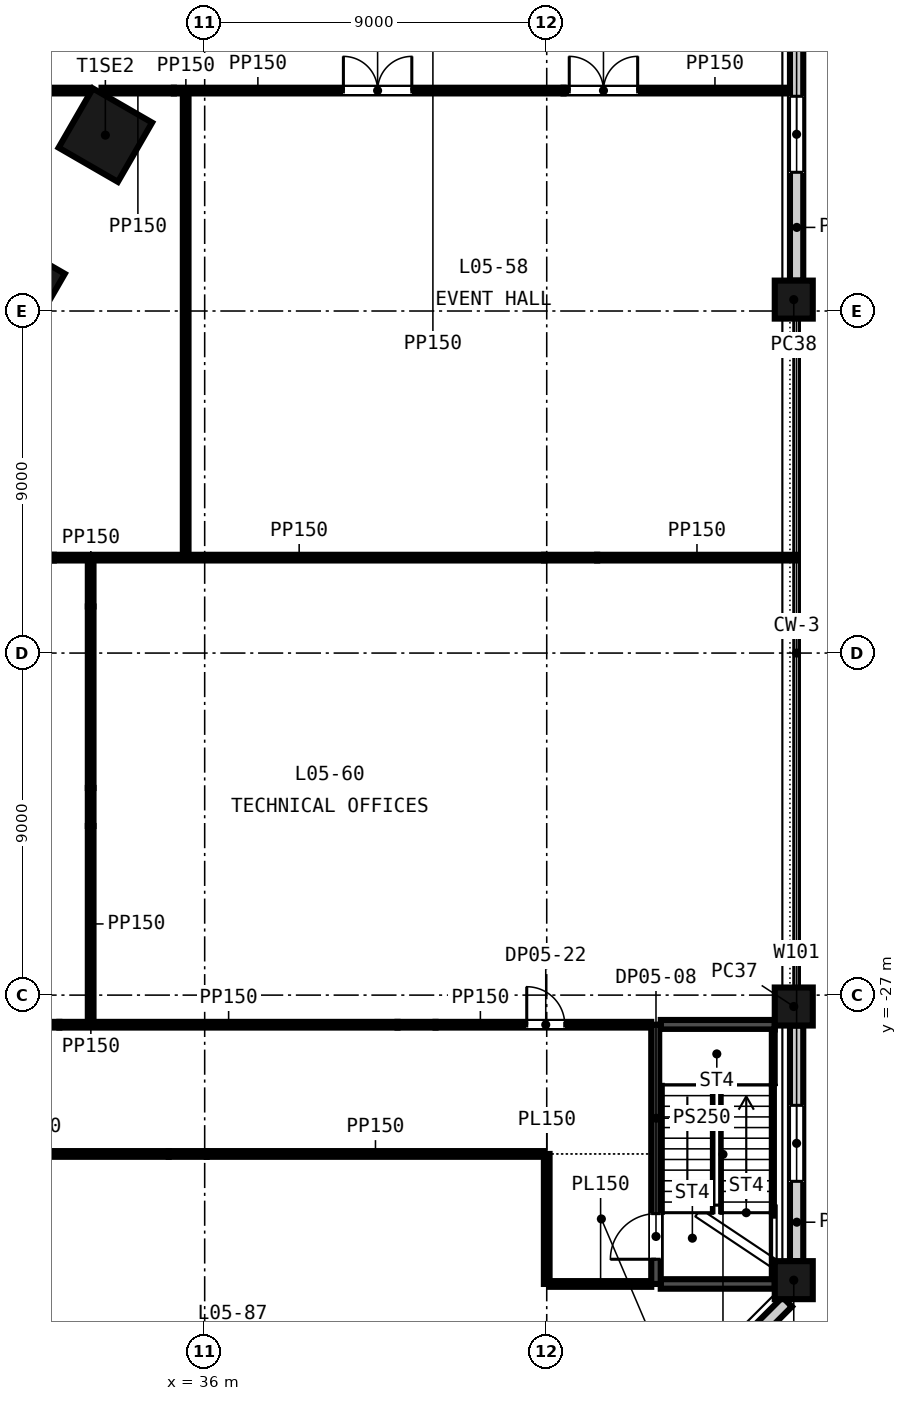
"""IFC4 building model, lengths in metres.
Left out: names, types, materials, properties, quantities, classifications, styles, units other than length and angle.
Written with IfcOpenShell. Run it as: python <this file> out.ifc"""

import sys

from ifc_helpers import new_model, si_unit, direction, frame, frame_2d, origin, origin_2d, place, context, subcontext, project, spatial, rectangle, extrude, element, fill, save


model = new_model("IFC4")
c1 = context("Model", 3, precision=1e-05, world=origin(), true_north=direction((0.0, 1.0)))
c2 = subcontext(c1, "Body", "Model", "MODEL_VIEW")
j1 = project(units=[si_unit("LENGTHUNIT", "METRE"), si_unit("PLANEANGLEUNIT", "RADIAN")], contexts=[c1])
p1 = place(None, origin())
s1 = spatial("IfcSite", under=j1, at=p1, CompositionType="ELEMENT")
p2 = place(p1, origin())
s2 = spatial("IfcBuilding", under=s1, at=p2, CompositionType="ELEMENT")
p3 = place(p2, frame((0.0, 0.0, 31.5)))
s3 = spatial("IfcBuildingStorey", under=s2, at=p3, CompositionType="ELEMENT", Elevation=31.5)
for number, where, z_axis, x_axis in (
    (1, (31.09, -8.35, -0.3), (0.0, 0.0, 1.0), (0.5, 0.866, 0.0)),
    (2, (33.387, -4.373, -0.3), (0.0, 0.0, 1.0), (0.5, 0.866, 0.0)),
):
    element("IfcColumn", number, at=place(p3, frame(where, z_axis=z_axis, x_axis=x_axis)), inside=s3, PredefinedType="COLUMN", context=c2, shape_type="SweptSolid", body=[
        extrude(rectangle(XDim=1.8, YDim=1.8, at=origin_2d()), origin(), (0.0, 0.0, 1.0), 4.65),
    ])
for number, where, z_axis, x_axis in (
    (3, (51.5, -34.5, -0.3), (0.0, 0.0, 1.0), (0.0, 1.0, 0.0)),
    (4, (51.5, -27.3, -0.3), (0.0, 0.0, 1.0), (0.0, 1.0, 0.0)),
    (5, (51.5, -8.7, -0.3), (0.0, 0.0, 1.0), (0.0, 1.0, 0.0)),
):
    element("IfcColumn", number, at=place(p3, frame(where, z_axis=z_axis, x_axis=x_axis)), inside=s3, PredefinedType="COLUMN", context=c2, shape_type="SweptSolid", body=[
        extrude(rectangle(XDim=1.0, YDim=1.0, at=origin_2d()), origin(), (0.0, 0.0, 1.0), 4.65),
    ])
p4 = place(p3, frame((46.072, -40.327, -0.3), z_axis=(0.0, 0.0, 1.0), x_axis=(0.707106781187, 0.707106781187, 0.0)))
e6 = element("IfcWall", 6, at=p4, inside=s3, PredefinedType="SOLIDWALL", context=c2, shape_type="SweptSolid", body=[
    extrude(rectangle(XDim=7.433, YDim=0.35, at=frame_2d((3.716, 0.0))), origin(), (0.0, 0.0, 1.0), 3.75),
])
p5 = place(p3, frame((51.575, -34.0, -0.3), z_axis=(0.0, 0.0, 1.0), x_axis=(0.0, 1.0, 0.0)))
e7 = element("IfcWall", 7, at=p5, inside=s3, PredefinedType="SOLIDWALL", context=c2, shape_type="SweptSolid", body=[
    extrude(rectangle(XDim=6.2, YDim=0.35, at=frame_2d((3.1, 0.0))), origin(), (0.0, 0.0, 1.0), 3.75),
])
p6 = place(p5, frame((2.1, 0.0, 1.2)))
e8 = element("IfcOpeningElement", 8, at=p6, cuts=e7, PredefinedType="OPENING", context=c2, shape_type="SweptSolid", body=[
    extrude(rectangle(XDim=2.0, YDim=2.5, at=frame_2d((1.0, 1.25))), frame((0.0, 0.185, 0.0), z_axis=(0.0, -1.0, 0.0), x_axis=(1.0, 0.0, 0.0)), (0.0, 0.0, 1.0), 0.37),
])
p7 = place(p3, frame((51.575, -8.2, -0.3), z_axis=(0.0, 0.0, 1.0), x_axis=(0.0, 1.0, 0.0)))
e9 = element("IfcWall", 9, at=p7, inside=s3, PredefinedType="SOLIDWALL", context=c2, shape_type="SweptSolid", body=[
    extrude(rectangle(XDim=7.7, YDim=0.35, at=frame_2d((3.85, 0.0))), origin(), (0.0, 0.0, 1.0), 3.75),
])
p8 = place(p7, frame((2.85, 0.0, 1.2)))
e10 = element("IfcOpeningElement", 10, at=p8, cuts=e9, PredefinedType="OPENING", context=c2, shape_type="SweptSolid", body=[
    extrude(rectangle(XDim=2.0, YDim=2.5, at=frame_2d((1.0, 1.25))), frame((0.0, 0.185, 0.0), z_axis=(0.0, -1.0, 0.0), x_axis=(1.0, 0.0, 0.0)), (0.0, 0.0, 1.0), 0.37),
])
p9 = place(p3, frame((45.075, -34.6, 0.0), z_axis=(0.0, 0.0, 1.0), x_axis=(1.0, 0.0, 0.0)))
e11 = element("IfcWall", 11, at=p9, inside=s3, PredefinedType="PARTITIONING", context=c2, shape_type="SweptSolid", body=[
    extrude(rectangle(XDim=2.675, YDim=0.15, at=frame_2d((1.337, 0.0))), origin(), (0.0, 0.0, 1.0), 4.35),
])
p10 = place(p3, frame((48.0, -34.6, 0.0), z_axis=(0.0, 0.0, 1.0), x_axis=(1.0, 0.0, 0.0)))
e12 = element("IfcWall", 12, at=p10, inside=s3, PredefinedType="SHEAR", context=c2, shape_type="SweptSolid", body=[
    extrude(rectangle(XDim=3.0, YDim=0.25, at=frame_2d((1.5, 0.0))), origin(), (0.0, 0.0, 1.0), 4.35),
])
p11 = place(p3, frame((27.843, -31.179, 0.0), z_axis=(0.0, 0.0, 1.0), x_axis=(1.0, 0.0, 0.0)))
e13 = element("IfcWall", 13, at=p11, inside=s3, PredefinedType="PARTITIONING", context=c2, shape_type="SweptSolid", body=[
    extrude(rectangle(XDim=7.209, YDim=0.15, at=frame_2d((3.605, 0.0))), origin(), (0.0, 0.0, 1.0), 4.35),
])
p12 = place(p3, frame((35.053, -31.179, 0.0), z_axis=(0.0, 0.0, 1.0), x_axis=(1.0, 0.0, 0.0)))
e14 = element("IfcWall", 14, at=p12, inside=s3, PredefinedType="PARTITIONING", context=c2, shape_type="SweptSolid", body=[
    extrude(rectangle(XDim=1.0, YDim=0.15, at=frame_2d((0.5, 0.0))), origin(), (0.0, 0.0, 1.0), 3.261),
])
p13 = place(p3, frame((36.053, -31.179, 0.0), z_axis=(0.0, 0.0, 1.0), x_axis=(1.0, 0.0, 0.0)))
e15 = element("IfcWall", 15, at=p13, inside=s3, PredefinedType="PARTITIONING", context=c2, shape_type="SweptSolid", body=[
    extrude(rectangle(XDim=8.872, YDim=0.15, at=frame_2d((4.436, 0.0))), origin(), (0.0, 0.0, 1.0), 4.35),
])
p14 = place(p3, frame((31.176, -27.779, 0.0), z_axis=(0.0, 0.0, 1.0), x_axis=(1.0, 0.0, 0.0)))
e16 = element("IfcWall", 16, at=p14, inside=s3, PredefinedType="PARTITIONING", context=c2, shape_type="SweptSolid", body=[
    extrude(rectangle(XDim=1.0, YDim=0.15, at=frame_2d((0.5, 0.0))), origin(), (0.0, 0.0, 1.0), 3.261),
])
p15 = place(p3, frame((32.176, -27.779, 0.0), z_axis=(0.0, 0.0, 1.0), x_axis=(1.0, 0.0, 0.0)))
e17 = element("IfcWall", 17, at=p15, inside=s3, PredefinedType="PARTITIONING", context=c2, shape_type="SweptSolid", body=[
    extrude(rectangle(XDim=8.898, YDim=0.15, at=frame_2d((4.449, 0.0))), origin(), (0.0, 0.0, 1.0), 4.35),
])
p16 = place(p3, frame((41.074, -27.779, 0.0), z_axis=(0.0, 0.0, 1.0), x_axis=(1.0, 0.0, 0.0)))
e18 = element("IfcWall", 18, at=p16, inside=s3, PredefinedType="PARTITIONING", context=c2, shape_type="SweptSolid", body=[
    extrude(rectangle(XDim=1.0, YDim=0.15, at=frame_2d((0.5, 0.0))), origin(), (0.0, 0.0, 1.0), 3.261),
])
p17 = place(p3, frame((42.074, -27.779, 0.0), z_axis=(0.0, 0.0, 1.0), x_axis=(1.0, 0.0, 0.0)))
e19 = element("IfcWall", 19, at=p17, inside=s3, PredefinedType="PARTITIONING", context=c2, shape_type="SweptSolid", body=[
    extrude(rectangle(XDim=5.676, YDim=0.15, at=frame_2d((2.838, 0.0))), origin(), (0.0, 0.0, 1.0), 4.35),
])
p18 = place(p17, frame((2.4, 0.0, 0.0)))
e20 = element("IfcOpeningElement", 20, at=p18, cuts=e19, PredefinedType="OPENING", context=c2, shape_type="SweptSolid", body=[
    extrude(rectangle(XDim=1.0, YDim=2.1, at=frame_2d((0.5, 1.05))), frame((0.0, 0.085, 0.0), z_axis=(0.0, -1.0, 0.0), x_axis=(1.0, 0.0, 0.0)), (0.0, 0.0, 1.0), 0.17),
])
p19 = place(p3, frame((48.0, -27.779, 0.0), z_axis=(0.0, 0.0, 1.0), x_axis=(1.0, 0.0, 0.0)))
e21 = element("IfcWall", 21, at=p19, inside=s3, PredefinedType="SHEAR", context=c2, shape_type="SweptSolid", body=[
    extrude(rectangle(XDim=3.0, YDim=0.25, at=frame_2d((1.5, 0.0))), origin(), (0.0, 0.0, 1.0), 4.35),
])
p20 = place(p3, frame((30.787, -15.489, 0.0), z_axis=(0.0, 0.0, 1.0), x_axis=(1.0, 0.0, 0.0)))
e22 = element("IfcWall", 22, at=p20, inside=s3, PredefinedType="PARTITIONING", context=c2, shape_type="SweptSolid", body=[
    extrude(rectangle(XDim=1.244, YDim=0.15, at=frame_2d((0.622, 0.0))), origin(), (0.0, 0.0, 1.0), 3.261),
])
p21 = place(p3, frame((32.031, -15.489, 0.0), z_axis=(0.0, 0.0, 1.0), x_axis=(1.0, 0.0, 0.0)))
e23 = element("IfcWall", 23, at=p21, inside=s3, PredefinedType="PARTITIONING", context=c2, shape_type="SweptSolid", body=[
    extrude(rectangle(XDim=12.901, YDim=0.15, at=frame_2d((6.451, 0.0))), origin(), (0.0, 0.0, 1.0), 4.35),
])
p22 = place(p3, frame((44.932, -15.489, 0.0), z_axis=(0.0, 0.0, 1.0), x_axis=(1.0, 0.0, 0.0)))
e24 = element("IfcWall", 24, at=p22, inside=s3, PredefinedType="PARTITIONING", context=c2, shape_type="SweptSolid", body=[
    extrude(rectangle(XDim=1.395, YDim=0.15, at=frame_2d((0.698, 0.0))), origin(), (0.0, 0.0, 1.0), 3.369),
])
p23 = place(p3, frame((46.327, -15.489, 0.0), z_axis=(0.0, 0.0, 1.0), x_axis=(1.0, 0.0, 0.0)))
e25 = element("IfcWall", 25, at=p23, inside=s3, PredefinedType="PARTITIONING", context=c2, shape_type="SweptSolid", body=[
    extrude(rectangle(XDim=5.243, YDim=0.15, at=frame_2d((2.622, 0.0))), origin(), (0.0, 0.0, 1.0), 4.35),
])
p24 = place(p3, frame((-17.925, -3.2, 0.0), z_axis=(0.0, 0.0, 1.0), x_axis=(1.0, 0.0, 0.0)))
e26 = element("IfcWall", 26, at=p24, inside=s3, PredefinedType="PARTITIONING", context=c2, shape_type="SweptSolid", body=[
    extrude(rectangle(XDim=50.906, YDim=0.15, at=frame_2d((25.453, 0.0))), origin(), (0.0, 0.0, 1.0), 4.35),
])
p25 = place(p24, frame((3.9, 0.0, 0.0)))
e27 = element("IfcOpeningElement", 27, at=p25, cuts=e26, PredefinedType="OPENING", context=c2, shape_type="SweptSolid", body=[
    extrude(rectangle(XDim=1.0, YDim=2.1, at=frame_2d((0.5, 1.05))), frame((0.0, 0.085, 0.0), z_axis=(0.0, -1.0, 0.0), x_axis=(1.0, 0.0, 0.0)), (0.0, 0.0, 1.0), 0.17),
])
p26 = place(p24, frame((28.575, 0.0, 0.0)))
e28 = element("IfcOpeningElement", 28, at=p26, cuts=e26, PredefinedType="OPENING", context=c2, shape_type="SweptSolid", body=[
    extrude(rectangle(XDim=1.0, YDim=2.1, at=frame_2d((0.5, 1.05))), frame((0.0, 0.085, 0.0), z_axis=(0.0, -1.0, 0.0), x_axis=(1.0, 0.0, 0.0)), (0.0, 0.0, 1.0), 0.17),
])
p27 = place(p24, frame((42.825, 0.0, 0.0)))
e29 = element("IfcOpeningElement", 29, at=p27, cuts=e26, PredefinedType="OPENING", context=c2, shape_type="SweptSolid", body=[
    extrude(rectangle(XDim=1.0, YDim=2.1, at=frame_2d((0.5, 1.05))), frame((0.0, 0.085, 0.0), z_axis=(0.0, -1.0, 0.0), x_axis=(1.0, 0.0, 0.0)), (0.0, 0.0, 1.0), 0.17),
])
p28 = place(p24, frame((11.575, 0.0, 0.0)))
e30 = element("IfcOpeningElement", 30, at=p28, cuts=e26, PredefinedType="OPENING", context=c2, shape_type="SweptSolid", body=[
    extrude(rectangle(XDim=1.0, YDim=2.1, at=frame_2d((0.5, 1.05))), frame((0.0, 0.085, 0.0), z_axis=(0.0, -1.0, 0.0), x_axis=(1.0, 0.0, 0.0)), (0.0, 0.0, 1.0), 0.17),
])
p29 = place(p24, frame((18.025, 0.0, 0.0)))
e31 = element("IfcOpeningElement", 31, at=p29, cuts=e26, PredefinedType="OPENING", context=c2, shape_type="SweptSolid", body=[
    extrude(rectangle(XDim=1.0, YDim=2.1, at=frame_2d((0.5, 1.05))), frame((0.0, 0.085, 0.0), z_axis=(0.0, -1.0, 0.0), x_axis=(1.0, 0.0, 0.0)), (0.0, 0.0, 1.0), 0.17),
])
p30 = place(p24, frame((22.725, 0.0, 0.0)))
e32 = element("IfcOpeningElement", 32, at=p30, cuts=e26, PredefinedType="OPENING", context=c2, shape_type="SweptSolid", body=[
    extrude(rectangle(XDim=1.0, YDim=2.1, at=frame_2d((0.5, 1.05))), frame((0.0, 0.085, 0.0), z_axis=(0.0, -1.0, 0.0), x_axis=(1.0, 0.0, 0.0)), (0.0, 0.0, 1.0), 0.17),
])
p31 = place(p24, frame((25.475, 0.0, 0.0)))
e33 = element("IfcOpeningElement", 33, at=p31, cuts=e26, PredefinedType="OPENING", context=c2, shape_type="SweptSolid", body=[
    extrude(rectangle(XDim=1.0, YDim=2.1, at=frame_2d((0.5, 1.05))), frame((0.0, 0.085, 0.0), z_axis=(0.0, -1.0, 0.0), x_axis=(1.0, 0.0, 0.0)), (0.0, 0.0, 1.0), 0.17),
])
p32 = place(p3, frame((33.286, -3.2, 0.0), z_axis=(0.0, 0.0, 1.0), x_axis=(1.0, 0.0, 0.0)))
e34 = element("IfcWall", 34, at=p32, inside=s3, PredefinedType="PARTITIONING", context=c2, shape_type="SweptSolid", body=[
    extrude(rectangle(XDim=1.904, YDim=0.15, at=frame_2d((0.952, 0.0))), origin(), (0.0, 0.0, 1.0), 3.5),
])
p33 = place(p3, frame((35.189, -3.2, 0.0), z_axis=(0.0, 0.0, 1.0), x_axis=(1.0, 0.0, 0.0)))
e35 = element("IfcWall", 35, at=p33, inside=s3, PredefinedType="PARTITIONING", context=c2, shape_type="SweptSolid", body=[
    extrude(rectangle(XDim=10.253, YDim=0.15, at=frame_2d((5.127, 0.0))), origin(), (0.0, 0.0, 1.0), 4.35),
])
p34 = place(p33, frame((4.46, 0.0, 0.0)))
e36 = element("IfcOpeningElement", 36, at=p34, cuts=e35, PredefinedType="OPENING", context=c2, shape_type="SweptSolid", body=[
    extrude(rectangle(XDim=1.8, YDim=2.4, at=frame_2d((0.9, 1.2))), frame((0.0, 0.085, 0.0), z_axis=(0.0, -1.0, 0.0), x_axis=(1.0, 0.0, 0.0)), (0.0, 0.0, 1.0), 0.17),
])
p35 = place(p3, frame((45.443, -3.2, 0.0), z_axis=(0.0, 0.0, 1.0), x_axis=(1.0, 0.0, 0.0)))
e37 = element("IfcWall", 37, at=p35, inside=s3, PredefinedType="PARTITIONING", context=c2, shape_type="SweptSolid", body=[
    extrude(rectangle(XDim=5.957, YDim=0.15, at=frame_2d((2.979, 0.0))), origin(), (0.0, 0.0, 1.0), 3.515),
])
p36 = place(p35, frame((0.15, 0.0, 0.0)))
e38 = element("IfcOpeningElement", 38, at=p36, cuts=e37, PredefinedType="OPENING", context=c2, shape_type="SweptSolid", body=[
    extrude(rectangle(XDim=1.8, YDim=2.4, at=frame_2d((0.9, 1.2))), frame((0.0, 0.085, 0.0), z_axis=(0.0, -1.0, 0.0), x_axis=(1.0, 0.0, 0.0)), (0.0, 0.0, 1.0), 0.17),
])
p37 = place(p3, frame((33.0, -27.704, 0.0), z_axis=(0.0, 0.0, 1.0), x_axis=(0.0, 1.0, 0.0)))
e39 = element("IfcWall", 39, at=p37, inside=s3, PredefinedType="PARTITIONING", context=c2, shape_type="SweptSolid", body=[
    extrude(rectangle(XDim=5.154, YDim=0.15, at=frame_2d((2.577, 0.0))), origin(), (0.0, 0.0, 1.0), 4.35),
])
p38 = place(p3, frame((33.0, -22.55, 0.0), z_axis=(0.0, 0.0, 1.0), x_axis=(0.0, 1.0, 0.0)))
e40 = element("IfcWall", 40, at=p38, inside=s3, PredefinedType="PARTITIONING", context=c2, shape_type="SweptSolid", body=[
    extrude(rectangle(XDim=1.0, YDim=0.15, at=frame_2d((0.5, 0.0))), origin(), (0.0, 0.0, 1.0), 3.261),
])
p39 = place(p3, frame((33.0, -21.55, 0.0), z_axis=(0.0, 0.0, 1.0), x_axis=(0.0, 1.0, 0.0)))
e41 = element("IfcWall", 41, at=p39, inside=s3, PredefinedType="PARTITIONING", context=c2, shape_type="SweptSolid", body=[
    extrude(rectangle(XDim=4.776, YDim=0.15, at=frame_2d((2.388, 0.0))), origin(), (0.0, 0.0, 1.0), 4.35),
])
p40 = place(p3, frame((33.0, -16.774, 0.0), z_axis=(0.0, 0.0, 1.0), x_axis=(0.0, 1.0, 0.0)))
e42 = element("IfcWall", 42, at=p40, inside=s3, PredefinedType="PARTITIONING", context=c2, shape_type="SweptSolid", body=[
    extrude(rectangle(XDim=1.21, YDim=0.15, at=frame_2d((0.605, 0.0))), origin(), (0.0, 0.0, 1.0), 3.261),
])
p41 = place(p3, frame((35.5, -15.414, 0.0), z_axis=(0.0, 0.0, 1.0), x_axis=(0.0, 1.0, 0.0)))
e43 = element("IfcWall", 43, at=p41, inside=s3, PredefinedType="PARTITIONING", context=c2, shape_type="SweptSolid", body=[
    extrude(rectangle(XDim=12.139, YDim=0.15, at=frame_2d((6.07, 0.0))), origin(), (0.0, 0.0, 1.0), 4.35),
])
p42 = place(p3, frame((45.0, -34.6, 0.0), z_axis=(0.0, 0.0, 1.0), x_axis=(0.0, 1.0, 0.0)))
e44 = element("IfcWall", 44, at=p42, inside=s3, PredefinedType="PARTITIONING", context=c2, shape_type="SweptSolid", body=[
    extrude(rectangle(XDim=3.421, YDim=0.15, at=frame_2d((1.71, 0.0))), origin(), (0.0, 0.0, 1.0), 4.35),
])
p43 = place(p3, frame((47.875, -34.6, 0.0), z_axis=(0.0, 0.0, 1.0), x_axis=(0.0, 1.0, 0.0)))
e45 = element("IfcWall", 45, at=p43, inside=s3, PredefinedType="SHEAR", context=c2, shape_type="SweptSolid", body=[
    extrude(rectangle(XDim=6.821, YDim=0.25, at=frame_2d((3.411, 0.0))), origin(), (0.0, 0.0, 1.0), 4.35),
])
p44 = place(p43, frame((0.65, 0.0, 0.0)))
e46 = element("IfcOpeningElement", 46, at=p44, cuts=e45, PredefinedType="OPENING", context=c2, shape_type="SweptSolid", body=[
    extrude(rectangle(XDim=1.2, YDim=2.1, at=frame_2d((0.6, 1.05))), frame((0.0, 0.135, 0.0), z_axis=(0.0, -1.0, 0.0), x_axis=(1.0, 0.0, 0.0)), (0.0, 0.0, 1.0), 0.27),
])
p45 = place(p6, origin())
e47 = element("IfcWindow", 47, at=p45, inside=s3, PartitioningType="SINGLE_PANEL", PredefinedType="WINDOW", context=c2, shape_type="SweptSolid", body=[
    extrude(rectangle(XDim=2.0, YDim=2.5, at=frame_2d((1.0, 1.25))), frame((0.0, 0.03, 0.0), z_axis=(0.0, -1.0, 0.0), x_axis=(1.0, 0.0, 0.0)), (0.0, 0.0, 1.0), 0.06),
])
fill(e8, e47)
p46 = place(p8, origin())
e48 = element("IfcWindow", 48, at=p46, inside=s3, PartitioningType="SINGLE_PANEL", PredefinedType="WINDOW", context=c2, shape_type="SweptSolid", body=[
    extrude(rectangle(XDim=2.0, YDim=2.5, at=frame_2d((1.0, 1.25))), frame((0.0, 0.03, 0.0), z_axis=(0.0, -1.0, 0.0), x_axis=(1.0, 0.0, 0.0)), (0.0, 0.0, 1.0), 0.06),
])
fill(e10, e48)
p47 = place(p44, origin())
e49 = element("IfcDoor", 49, at=p47, inside=s3, OperationType="SINGLE_SWING_LEFT", PredefinedType="DOOR", context=c2, shape_type="SweptSolid", body=[
    extrude(rectangle(XDim=1.2, YDim=2.1, at=frame_2d((0.6, 1.05))), frame((0.0, 0.025, 0.0), z_axis=(0.0, -1.0, 0.0), x_axis=(1.0, 0.0, 0.0)), (0.0, 0.0, 1.0), 0.05),
])
fill(e46, e49)
p48 = place(p34, origin())
e50 = element("IfcDoor", 50, at=p48, inside=s3, OperationType="SINGLE_SWING_LEFT", PredefinedType="DOOR", context=c2, shape_type="SweptSolid", body=[
    extrude(rectangle(XDim=1.8, YDim=2.4, at=frame_2d((0.9, 1.2))), frame((0.0, 0.025, 0.0), z_axis=(0.0, -1.0, 0.0), x_axis=(1.0, 0.0, 0.0)), (0.0, 0.0, 1.0), 0.05),
])
fill(e36, e50)
p49 = place(p36, origin())
e51 = element("IfcDoor", 51, at=p49, inside=s3, OperationType="SINGLE_SWING_LEFT", PredefinedType="DOOR", context=c2, shape_type="SweptSolid", body=[
    extrude(rectangle(XDim=1.8, YDim=2.4, at=frame_2d((0.9, 1.2))), frame((0.0, 0.025, 0.0), z_axis=(0.0, -1.0, 0.0), x_axis=(1.0, 0.0, 0.0)), (0.0, 0.0, 1.0), 0.05),
])
fill(e38, e51)
p50 = place(p18, origin())
e52 = element("IfcDoor", 52, at=p50, inside=s3, OperationType="SINGLE_SWING_LEFT", PredefinedType="DOOR", context=c2, shape_type="SweptSolid", body=[
    extrude(rectangle(XDim=1.0, YDim=2.1, at=frame_2d((0.5, 1.05))), frame((0.0, 0.025, 0.0), z_axis=(0.0, -1.0, 0.0), x_axis=(1.0, 0.0, 0.0)), (0.0, 0.0, 1.0), 0.05),
])
fill(e20, e52)
save(model, sys.argv[1])
